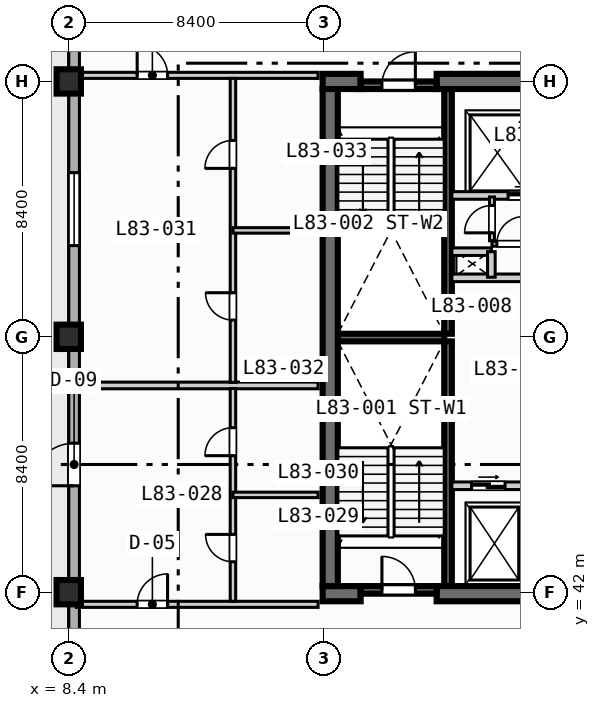
"""IFC4 building model, lengths in metres.
Left out: names, types, materials, properties, quantities, classifications, styles, units other than length and angle.
Written with IfcOpenShell. Run it as: python <this file> out.ifc"""

import sys

from ifc_helpers import new_model, si_unit, direction, frame, frame_2d, origin, origin_2d, place, context, subcontext, project, spatial, rectangle, extrude, element, fill, save


model = new_model("IFC4")
c1 = context("Model", 3, precision=1e-05, world=origin(), true_north=direction((0.0, 1.0)))
c2 = subcontext(c1, "Body", "Model", "MODEL_VIEW")
j1 = project(units=[si_unit("LENGTHUNIT", "METRE"), si_unit("PLANEANGLEUNIT", "RADIAN")], contexts=[c1])
p1 = place(None, origin())
s1 = spatial("IfcSite", under=j1, at=p1, CompositionType="ELEMENT")
p2 = place(p1, origin())
s2 = spatial("IfcBuilding", under=s1, at=p2, CompositionType="ELEMENT")
p3 = place(p2, frame((0.0, 0.0, 335.9)))
s3 = spatial("IfcBuildingStorey", under=s2, at=p3, CompositionType="ELEMENT", Elevation=335.9)
for number, where, z_axis, x_axis in (
    (1, (20.875, 42.2, 0.0), (0.0, 0.0, 1.0), (0.0, 1.0, 0.0)),
    (2, (20.875, 50.5, 0.0), (0.0, 0.0, 1.0), (0.0, 1.0, 0.0)),
):
    element("IfcWall", number, at=place(p3, frame(where, z_axis=z_axis, x_axis=x_axis)), inside=s3, PredefinedType="SOLIDWALL", context=c2, shape_type="SweptSolid", body=[
        extrude(rectangle(XDim=8.05, YDim=0.25, at=frame_2d((4.025, 0.0))), origin(), (0.0, 0.0, 1.0), 3.67),
    ])
p4 = place(p3, frame((17.25, 50.375, 0.0), z_axis=(0.0, 0.0, 1.0), x_axis=(1.0, 0.0, 0.0)))
e3 = element("IfcWall", 3, at=p4, inside=s3, PredefinedType="SOLIDWALL", context=c2, shape_type="SweptSolid", body=[
    extrude(rectangle(XDim=3.5, YDim=0.25, at=frame_2d((1.75, 0.0))), origin(), (0.0, 0.0, 1.0), 3.67),
])
p5 = place(p3, frame((16.75, 41.95, 0.0), z_axis=(0.0, 0.0, 1.0), x_axis=(1.0, 0.0, 0.0)))
e4 = element("IfcWall", 4, at=p5, inside=s3, PredefinedType="SHEAR", context=c2, shape_type="SweptSolid", body=[
    extrude(rectangle(XDim=1.25, YDim=0.5, at=frame_2d((0.625, 0.0))), origin(), (0.0, 0.0, 1.0), 3.67),
])
p6 = place(p3, frame((20.5, 41.95, 0.0), z_axis=(0.0, 0.0, 1.0), x_axis=(1.0, 0.0, 0.0)))
e5 = element("IfcWall", 5, at=p6, inside=s3, PredefinedType="SHEAR", context=c2, shape_type="SweptSolid", body=[
    extrude(rectangle(XDim=4.95, YDim=0.5, at=frame_2d((2.475, 0.0))), origin(), (0.0, 0.0, 1.0), 3.67),
])
p7 = place(p3, frame((16.75, 58.8, 0.0), z_axis=(0.0, 0.0, 1.0), x_axis=(1.0, 0.0, 0.0)))
e6 = element("IfcWall", 6, at=p7, inside=s3, PredefinedType="SHEAR", context=c2, shape_type="SweptSolid", body=[
    extrude(rectangle(XDim=1.25, YDim=0.5, at=frame_2d((0.625, 0.0))), origin(), (0.0, 0.0, 1.0), 3.67),
])
p8 = place(p3, frame((20.5, 58.8, 0.0), z_axis=(0.0, 0.0, 1.0), x_axis=(1.0, 0.0, 0.0)))
e7 = element("IfcWall", 7, at=p8, inside=s3, PredefinedType="SHEAR", context=c2, shape_type="SweptSolid", body=[
    extrude(rectangle(XDim=4.95, YDim=0.5, at=frame_2d((2.475, 0.0))), origin(), (0.0, 0.0, 1.0), 3.67),
])
p9 = place(p3, frame((17.0, 42.2, 0.0), z_axis=(0.0, 0.0, 1.0), x_axis=(0.0, 1.0, 0.0)))
e8 = element("IfcWall", 8, at=p9, inside=s3, PredefinedType="SHEAR", context=c2, shape_type="SweptSolid", body=[
    extrude(rectangle(XDim=16.35, YDim=0.5, at=frame_2d((8.175, 0.0))), origin(), (0.0, 0.0, 1.0), 3.67),
])
for number, where, z_axis, x_axis in (
    (9, (8.4, 42.0, 0.0), (0.0, 0.0, 1.0), (1.0, 0.0, 0.0)),
    (10, (8.4, 50.4, 0.0), (0.0, 0.0, 1.0), (1.0, 0.0, 0.0)),
    (11, (8.4, 58.8, 0.0), (0.0, 0.0, 1.0), (1.0, 0.0, 0.0)),
):
    element("IfcColumn", number, at=place(p3, frame(where, z_axis=z_axis, x_axis=x_axis)), inside=s3, PredefinedType="COLUMN", context=c2, shape_type="SweptSolid", body=[
        extrude(rectangle(XDim=0.8, YDim=0.8, at=origin_2d()), origin(), (0.0, 0.0, 1.0), 3.9),
    ])
p10 = place(p3, frame((8.575, 11.575, 0.0), z_axis=(0.0, 0.0, 1.0), x_axis=(0.0, 1.0, 0.0)))
e12 = element("IfcWall", 12, at=p10, inside=s3, PredefinedType="STANDARD", context=c2, shape_type="SweptSolid", body=[
    extrude(rectangle(XDim=60.85, YDim=0.35, at=frame_2d((30.425, 0.0))), origin(), (0.0, 0.0, 1.0), 3.67),
])
p11 = place(p10, frame((33.925, 0.0, 0.0)))
e13 = element("IfcOpeningElement", 13, at=p11, cuts=e12, PredefinedType="OPENING", context=c2, shape_type="SweptSolid", body=[
    extrude(rectangle(XDim=1.4, YDim=2.2, at=frame_2d((0.7, 1.1))), frame((0.0, 0.185, 0.0), z_axis=(0.0, -1.0, 0.0), x_axis=(1.0, 0.0, 0.0)), (0.0, 0.0, 1.0), 0.37),
])
p12 = place(p10, frame((25.025, 0.0, 0.85)))
e14 = element("IfcOpeningElement", 14, at=p12, cuts=e12, PredefinedType="OPENING", context=c2, shape_type="SweptSolid", body=[
    extrude(rectangle(XDim=2.4, YDim=1.95, at=frame_2d((1.2, 0.975))), frame((0.0, 0.185, 0.0), z_axis=(0.0, -1.0, 0.0), x_axis=(1.0, 0.0, 0.0)), (0.0, 0.0, 1.0), 0.37),
])
p13 = place(p10, frame((41.825, 0.0, 0.85)))
e15 = element("IfcOpeningElement", 15, at=p13, cuts=e12, PredefinedType="OPENING", context=c2, shape_type="SweptSolid", body=[
    extrude(rectangle(XDim=2.4, YDim=1.95, at=frame_2d((1.2, 0.975))), frame((0.0, 0.185, 0.0), z_axis=(0.0, -1.0, 0.0), x_axis=(1.0, 0.0, 0.0)), (0.0, 0.0, 1.0), 0.37),
])
p14 = place(p10, frame((19.25, 0.0, 0.85)))
e16 = element("IfcOpeningElement", 16, at=p14, cuts=e12, PredefinedType="OPENING", context=c2, shape_type="SweptSolid", body=[
    extrude(rectangle(XDim=1.8, YDim=1.8, at=frame_2d((0.9, 0.9))), frame((0.0, 0.185, 0.0), z_axis=(0.0, -1.0, 0.0), x_axis=(1.0, 0.0, 0.0)), (0.0, 0.0, 1.0), 0.37),
])
p15 = place(p3, frame((18.0, 42.075, 0.0), z_axis=(0.0, 0.0, 1.0), x_axis=(1.0, 0.0, 0.0)))
e17 = element("IfcWall", 17, at=p15, inside=s3, PredefinedType="SOLIDWALL", context=c2, shape_type="SweptSolid", body=[
    extrude(rectangle(XDim=2.5, YDim=0.25, at=frame_2d((1.25, 0.0))), origin(), (0.0, 0.0, 1.0), 3.67),
])
p16 = place(p15, frame((0.7, 0.0, 0.0)))
e18 = element("IfcOpeningElement", 18, at=p16, cuts=e17, PredefinedType="OPENING", context=c2, shape_type="SweptSolid", body=[
    extrude(rectangle(XDim=1.1, YDim=2.15, at=frame_2d((0.55, 1.075))), frame((0.0, 0.135, 0.0), z_axis=(0.0, -1.0, 0.0), x_axis=(1.0, 0.0, 0.0)), (0.0, 0.0, 1.0), 0.27),
])
p17 = place(p3, frame((18.0, 58.675, 0.0), z_axis=(0.0, 0.0, 1.0), x_axis=(1.0, 0.0, 0.0)))
e19 = element("IfcWall", 19, at=p17, inside=s3, PredefinedType="SOLIDWALL", context=c2, shape_type="SweptSolid", body=[
    extrude(rectangle(XDim=2.5, YDim=0.25, at=frame_2d((1.25, 0.0))), origin(), (0.0, 0.0, 1.0), 3.67),
])
p18 = place(p17, frame((0.7, 0.0, 0.0)))
e20 = element("IfcOpeningElement", 20, at=p18, cuts=e19, PredefinedType="OPENING", context=c2, shape_type="SweptSolid", body=[
    extrude(rectangle(XDim=1.1, YDim=2.15, at=frame_2d((0.55, 1.075))), frame((0.0, 0.135, 0.0), z_axis=(0.0, -1.0, 0.0), x_axis=(1.0, 0.0, 0.0)), (0.0, 0.0, 1.0), 0.27),
])
p19 = place(p3, frame((21.0, 45.5, 0.0), z_axis=(0.0, 0.0, 1.0), x_axis=(1.0, 0.0, 0.0)))
e21 = element("IfcWall", 21, at=p19, inside=s3, PredefinedType="SOLIDWALL", context=c2, shape_type="SweptSolid", body=[
    extrude(rectangle(XDim=4.15, YDim=0.25, at=frame_2d((2.075, 0.0))), origin(), (0.0, 0.0, 1.0), 3.67),
])
p20 = place(p19, frame((0.65, 0.0, 0.0)))
e22 = element("IfcOpeningElement", 22, at=p20, cuts=e21, PredefinedType="OPENING", context=c2, shape_type="SweptSolid", body=[
    extrude(rectangle(XDim=1.1, YDim=2.15, at=frame_2d((0.55, 1.075))), frame((0.0, 0.135, 0.0), z_axis=(0.0, -1.0, 0.0), x_axis=(1.0, 0.0, 0.0)), (0.0, 0.0, 1.0), 0.27),
])
p21 = place(p3, frame((21.0, 52.34, 0.0), z_axis=(0.0, 0.0, 1.0), x_axis=(1.0, 0.0, 0.0)))
e23 = element("IfcWall", 23, at=p21, inside=s3, PredefinedType="SOLIDWALL", context=c2, shape_type="SweptSolid", body=[
    extrude(rectangle(XDim=3.95, YDim=0.25, at=frame_2d((1.975, 0.0))), origin(), (0.0, 0.0, 1.0), 3.67),
])
p22 = place(p3, frame((21.0, 55.05, 0.0), z_axis=(0.0, 0.0, 1.0), x_axis=(1.0, 0.0, 0.0)))
e24 = element("IfcWall", 24, at=p22, inside=s3, PredefinedType="SOLIDWALL", context=c2, shape_type="SweptSolid", body=[
    extrude(rectangle(XDim=4.15, YDim=0.25, at=frame_2d((2.075, 0.0))), origin(), (0.0, 0.0, 1.0), 3.67),
])
p23 = place(p22, frame((1.85, 0.0, 0.0)))
e25 = element("IfcOpeningElement", 25, at=p23, cuts=e24, PredefinedType="OPENING", context=c2, shape_type="SweptSolid", body=[
    extrude(rectangle(XDim=1.1, YDim=2.15, at=frame_2d((0.55, 1.075))), frame((0.0, 0.135, 0.0), z_axis=(0.0, -1.0, 0.0), x_axis=(1.0, 0.0, 0.0)), (0.0, 0.0, 1.0), 0.27),
])
p24 = place(p3, frame((21.0, 53.2, 0.0), z_axis=(0.0, 0.0, 1.0), x_axis=(1.0, 0.0, 0.0)))
e26 = element("IfcWall", 26, at=p24, inside=s3, PredefinedType="SOLIDWALL", context=c2, shape_type="SweptSolid", body=[
    extrude(rectangle(XDim=1.3, YDim=0.25, at=frame_2d((0.65, 0.0))), origin(), (0.0, 0.0, 1.0), 3.67),
])
p25 = place(p3, frame((22.3, 52.36, 0.0), z_axis=(0.0, 0.0, 1.0), x_axis=(0.0, 1.0, 0.0)))
e27 = element("IfcWall", 27, at=p25, inside=s3, PredefinedType="SOLIDWALL", context=c2, shape_type="SweptSolid", body=[
    extrude(rectangle(XDim=0.84, YDim=0.25, at=frame_2d((0.42, 0.0))), origin(), (0.0, 0.0, 1.0), 3.67),
])
p26 = place(p3, frame((22.32, 53.56, 0.0), z_axis=(0.0, 0.0, 1.0), x_axis=(0.0, 1.0, 0.0)))
e28 = element("IfcWall", 28, at=p26, inside=s3, PredefinedType="PARTITIONING", context=c2, shape_type="SweptSolid", body=[
    extrude(rectangle(XDim=1.44, YDim=0.16, at=frame_2d((0.72, 0.0))), origin(), (0.0, 0.0, 1.0), 3.67),
])
p27 = place(p26, frame((0.26, 0.0, 0.0)))
e29 = element("IfcOpeningElement", 29, at=p27, cuts=e28, PredefinedType="OPENING", context=c2, shape_type="SweptSolid", body=[
    extrude(rectangle(XDim=0.9, YDim=2.1, at=frame_2d((0.45, 1.05))), frame((0.0, 0.09, 0.0), z_axis=(0.0, -1.0, 0.0), x_axis=(1.0, 0.0, 0.0)), (0.0, 0.0, 1.0), 0.18),
])
p28 = place(p3, frame((22.32, 53.46, 0.0), z_axis=(0.0, 0.0, 1.0), x_axis=(1.0, 0.0, 0.0)))
e30 = element("IfcWall", 30, at=p28, inside=s3, PredefinedType="PARTITIONING", context=c2, shape_type="SweptSolid", body=[
    extrude(rectangle(XDim=2.36, YDim=0.16, at=frame_2d((1.18, 0.0))), origin(), (0.0, 0.0, 1.0), 3.67),
])
p29 = place(p28, frame((0.16, 0.0, 0.0)))
e31 = element("IfcOpeningElement", 31, at=p29, cuts=e30, PredefinedType="OPENING", context=c2, shape_type="SweptSolid", body=[
    extrude(rectangle(XDim=0.9, YDim=2.1, at=frame_2d((0.45, 1.05))), frame((0.0, 0.09, 0.0), z_axis=(0.0, -1.0, 0.0), x_axis=(1.0, 0.0, 0.0)), (0.0, 0.0, 1.0), 0.18),
])
p30 = place(p3, frame((8.65, 41.6, 0.0), z_axis=(0.0, 0.0, 1.0), x_axis=(1.0, 0.0, 0.0)))
e32 = element("IfcWall", 32, at=p30, inside=s3, PredefinedType="PARTITIONING", context=c2, shape_type="SweptSolid", body=[
    extrude(rectangle(XDim=7.95, YDim=0.2, at=frame_2d((3.975, 0.0))), origin(), (0.0, 0.0, 1.0), 3.67),
])
p31 = place(p30, frame((2.0, 0.0, 0.0)))
e33 = element("IfcOpeningElement", 33, at=p31, cuts=e32, PredefinedType="OPENING", context=c2, shape_type="SweptSolid", body=[
    extrude(rectangle(XDim=1.0, YDim=2.15, at=frame_2d((0.5, 1.075))), frame((0.0, 0.11, 0.0), z_axis=(0.0, -1.0, 0.0), x_axis=(1.0, 0.0, 0.0)), (0.0, 0.0, 1.0), 0.22),
])
p32 = place(p3, frame((8.65, 59.0, 0.0), z_axis=(0.0, 0.0, 1.0), x_axis=(1.0, 0.0, 0.0)))
e34 = element("IfcWall", 34, at=p32, inside=s3, PredefinedType="PARTITIONING", context=c2, shape_type="SweptSolid", body=[
    extrude(rectangle(XDim=7.95, YDim=0.2, at=frame_2d((3.975, 0.0))), origin(), (0.0, 0.0, 1.0), 3.207),
])
p33 = place(p32, frame((2.0, 0.0, 0.0)))
e35 = element("IfcOpeningElement", 35, at=p33, cuts=e34, PredefinedType="OPENING", context=c2, shape_type="SweptSolid", body=[
    extrude(rectangle(XDim=1.0, YDim=2.15, at=frame_2d((0.5, 1.075))), frame((0.0, 0.11, 0.0), z_axis=(0.0, -1.0, 0.0), x_axis=(1.0, 0.0, 0.0)), (0.0, 0.0, 1.0), 0.22),
])
p34 = place(p3, frame((8.65, 48.8, 0.0), z_axis=(0.0, 0.0, 1.0), x_axis=(1.0, 0.0, 0.0)))
e36 = element("IfcWall", 36, at=p34, inside=s3, PredefinedType="PARTITIONING", context=c2, shape_type="SweptSolid", body=[
    extrude(rectangle(XDim=7.95, YDim=0.22, at=frame_2d((3.975, 0.0))), origin(), (0.0, 0.0, 1.0), 3.67),
])
p35 = place(p3, frame((13.8, 41.7, 0.0), z_axis=(0.0, 0.0, 1.0), x_axis=(0.0, 1.0, 0.0)))
e37 = element("IfcWall", 37, at=p35, inside=s3, PredefinedType="PLUMBINGWALL", context=c2, shape_type="SweptSolid", body=[
    extrude(rectangle(XDim=7.0, YDim=0.18, at=frame_2d((3.5, 0.0))), origin(), (0.0, 0.0, 1.0), 3.67),
])
p36 = place(p35, frame((1.3, 0.0, 0.0)))
e38 = element("IfcOpeningElement", 38, at=p36, cuts=e37, PredefinedType="OPENING", context=c2, shape_type="SweptSolid", body=[
    extrude(rectangle(XDim=0.9, YDim=2.1, at=frame_2d((0.45, 1.05))), frame((0.0, 0.1, 0.0), z_axis=(0.0, -1.0, 0.0), x_axis=(1.0, 0.0, 0.0)), (0.0, 0.0, 1.0), 0.2),
])
p37 = place(p35, frame((4.79, 0.0, 0.0)))
e39 = element("IfcOpeningElement", 39, at=p37, cuts=e37, PredefinedType="OPENING", context=c2, shape_type="SweptSolid", body=[
    extrude(rectangle(XDim=0.92, YDim=2.1, at=frame_2d((0.46, 1.05))), frame((0.0, 0.1, 0.0), z_axis=(0.0, -1.0, 0.0), x_axis=(1.0, 0.0, 0.0)), (0.0, 0.0, 1.0), 0.2),
])
p38 = place(p3, frame((13.8, 45.2, 0.0), z_axis=(0.0, 0.0, 1.0), x_axis=(1.0, 0.0, 0.0)))
e40 = element("IfcWall", 40, at=p38, inside=s3, PredefinedType="PLUMBINGWALL", context=c2, shape_type="SweptSolid", body=[
    extrude(rectangle(XDim=2.8, YDim=0.18, at=frame_2d((1.4, 0.0))), origin(), (0.0, 0.0, 1.0), 3.67),
])
p39 = place(p3, frame((13.8, 48.9, 0.0), z_axis=(0.0, 0.0, 1.0), x_axis=(0.0, 1.0, 0.0)))
e41 = element("IfcWall", 41, at=p39, inside=s3, PredefinedType="PLUMBINGWALL", context=c2, shape_type="SweptSolid", body=[
    extrude(rectangle(XDim=10.0, YDim=0.18, at=frame_2d((5.0, 0.0))), origin(), (0.0, 0.0, 1.0), 3.67),
])
p40 = place(p39, frame((2.05, 0.0, 0.0)))
e42 = element("IfcOpeningElement", 42, at=p40, cuts=e41, PredefinedType="OPENING", context=c2, shape_type="SweptSolid", body=[
    extrude(rectangle(XDim=0.9, YDim=2.1, at=frame_2d((0.45, 1.05))), frame((0.0, 0.1, 0.0), z_axis=(0.0, -1.0, 0.0), x_axis=(1.0, 0.0, 0.0)), (0.0, 0.0, 1.0), 0.2),
])
p41 = place(p39, frame((7.04, 0.0, 0.0)))
e43 = element("IfcOpeningElement", 43, at=p41, cuts=e41, PredefinedType="OPENING", context=c2, shape_type="SweptSolid", body=[
    extrude(rectangle(XDim=0.92, YDim=2.1, at=frame_2d((0.46, 1.05))), frame((0.0, 0.1, 0.0), z_axis=(0.0, -1.0, 0.0), x_axis=(1.0, 0.0, 0.0)), (0.0, 0.0, 1.0), 0.2),
])
p42 = place(p3, frame((13.8, 53.9, 0.0), z_axis=(0.0, 0.0, 1.0), x_axis=(1.0, 0.0, 0.0)))
e44 = element("IfcWall", 44, at=p42, inside=s3, PredefinedType="PLUMBINGWALL", context=c2, shape_type="SweptSolid", body=[
    extrude(rectangle(XDim=2.8, YDim=0.18, at=frame_2d((1.4, 0.0))), origin(), (0.0, 0.0, 1.0), 3.67),
])
p43 = place(p11, origin())
e45 = element("IfcDoor", 45, at=p43, inside=s3, OperationType="SINGLE_SWING_LEFT", PredefinedType="DOOR", context=c2, shape_type="SweptSolid", body=[
    extrude(rectangle(XDim=1.4, YDim=2.2, at=frame_2d((0.7, 1.1))), frame((0.0, 0.025, 0.0), z_axis=(0.0, -1.0, 0.0), x_axis=(1.0, 0.0, 0.0)), (0.0, 0.0, 1.0), 0.05),
])
fill(e13, e45)
p44 = place(p13, origin())
e46 = element("IfcWindow", 46, at=p44, inside=s3, PartitioningType="SINGLE_PANEL", PredefinedType="WINDOW", context=c2, shape_type="SweptSolid", body=[
    extrude(rectangle(XDim=2.4, YDim=1.95, at=frame_2d((1.2, 0.975))), frame((0.0, 0.03, 0.0), z_axis=(0.0, -1.0, 0.0), x_axis=(1.0, 0.0, 0.0)), (0.0, 0.0, 1.0), 0.06),
])
fill(e15, e46)
p45 = place(p16, origin())
e47 = element("IfcDoor", 47, at=p45, inside=s3, OperationType="SINGLE_SWING_LEFT", PredefinedType="DOOR", context=c2, shape_type="SweptSolid", body=[
    extrude(rectangle(XDim=1.1, YDim=2.15, at=frame_2d((0.55, 1.075))), frame((0.0, 0.025, 0.0), z_axis=(0.0, -1.0, 0.0), x_axis=(1.0, 0.0, 0.0)), (0.0, 0.0, 1.0), 0.05),
])
fill(e18, e47)
p46 = place(p18, origin())
e48 = element("IfcDoor", 48, at=p46, inside=s3, OperationType="SINGLE_SWING_RIGHT", PredefinedType="DOOR", context=c2, shape_type="SweptSolid", body=[
    extrude(rectangle(XDim=1.1, YDim=2.15, at=frame_2d((0.55, 1.075))), frame((0.0, 0.025, 0.0), z_axis=(0.0, -1.0, 0.0), x_axis=(1.0, 0.0, 0.0)), (0.0, 0.0, 1.0), 0.05),
])
fill(e20, e48)
p47 = place(p20, origin())
e49 = element("IfcDoor", 49, at=p47, inside=s3, OperationType="SLIDING_TO_LEFT", PredefinedType="DOOR", context=c2, shape_type="SweptSolid", body=[
    extrude(rectangle(XDim=1.1, YDim=2.15, at=frame_2d((0.55, 1.075))), frame((0.0, 0.025, 0.0), z_axis=(0.0, -1.0, 0.0), x_axis=(1.0, 0.0, 0.0)), (0.0, 0.0, 1.0), 0.05),
])
fill(e22, e49)
p48 = place(p23, origin())
e50 = element("IfcDoor", 50, at=p48, inside=s3, OperationType="SLIDING_TO_LEFT", PredefinedType="DOOR", context=c2, shape_type="SweptSolid", body=[
    extrude(rectangle(XDim=1.1, YDim=2.15, at=frame_2d((0.55, 1.075))), frame((0.0, 0.025, 0.0), z_axis=(0.0, -1.0, 0.0), x_axis=(1.0, 0.0, 0.0)), (0.0, 0.0, 1.0), 0.05),
])
fill(e25, e50)
p49 = place(p27, origin())
e51 = element("IfcDoor", 51, at=p49, inside=s3, OperationType="SINGLE_SWING_LEFT", PredefinedType="DOOR", context=c2, shape_type="SweptSolid", body=[
    extrude(rectangle(XDim=0.9, YDim=2.1, at=frame_2d((0.45, 1.05))), frame((0.0, 0.025, 0.0), z_axis=(0.0, -1.0, 0.0), x_axis=(1.0, 0.0, 0.0)), (0.0, 0.0, 1.0), 0.05),
])
fill(e29, e51)
p50 = place(p29, origin())
e52 = element("IfcDoor", 52, at=p50, inside=s3, OperationType="SINGLE_SWING_RIGHT", PredefinedType="DOOR", context=c2, shape_type="SweptSolid", body=[
    extrude(rectangle(XDim=0.9, YDim=2.1, at=frame_2d((0.45, 1.05))), frame((0.0, 0.025, 0.0), z_axis=(0.0, -1.0, 0.0), x_axis=(1.0, 0.0, 0.0)), (0.0, 0.0, 1.0), 0.05),
])
fill(e31, e52)
p51 = place(p31, origin())
e53 = element("IfcDoor", 53, at=p51, inside=s3, OperationType="SINGLE_SWING_RIGHT", PredefinedType="DOOR", context=c2, shape_type="SweptSolid", body=[
    extrude(rectangle(XDim=1.0, YDim=2.15, at=frame_2d((0.5, 1.075))), frame((0.0, 0.025, 0.0), z_axis=(0.0, -1.0, 0.0), x_axis=(1.0, 0.0, 0.0)), (0.0, 0.0, 1.0), 0.05),
])
fill(e33, e53)
p52 = place(p33, origin())
e54 = element("IfcDoor", 54, at=p52, inside=s3, OperationType="SINGLE_SWING_LEFT", PredefinedType="DOOR", context=c2, shape_type="SweptSolid", body=[
    extrude(rectangle(XDim=1.0, YDim=2.15, at=frame_2d((0.5, 1.075))), frame((0.0, 0.025, 0.0), z_axis=(0.0, -1.0, 0.0), x_axis=(1.0, 0.0, 0.0)), (0.0, 0.0, 1.0), 0.05),
])
fill(e35, e54)
p53 = place(p36, origin())
e55 = element("IfcDoor", 55, at=p53, inside=s3, OperationType="SINGLE_SWING_RIGHT", PredefinedType="DOOR", context=c2, shape_type="SweptSolid", body=[
    extrude(rectangle(XDim=0.9, YDim=2.1, at=frame_2d((0.45, 1.05))), frame((0.0, 0.025, 0.0), z_axis=(0.0, -1.0, 0.0), x_axis=(1.0, 0.0, 0.0)), (0.0, 0.0, 1.0), 0.05),
])
fill(e38, e55)
p54 = place(p37, origin())
e56 = element("IfcDoor", 56, at=p54, inside=s3, OperationType="SINGLE_SWING_LEFT", PredefinedType="DOOR", context=c2, shape_type="SweptSolid", body=[
    extrude(rectangle(XDim=0.92, YDim=2.1, at=frame_2d((0.46, 1.05))), frame((0.0, 0.025, 0.0), z_axis=(0.0, -1.0, 0.0), x_axis=(1.0, 0.0, 0.0)), (0.0, 0.0, 1.0), 0.05),
])
fill(e39, e56)
p55 = place(p40, origin())
e57 = element("IfcDoor", 57, at=p55, inside=s3, OperationType="SINGLE_SWING_RIGHT", PredefinedType="DOOR", context=c2, shape_type="SweptSolid", body=[
    extrude(rectangle(XDim=0.9, YDim=2.1, at=frame_2d((0.45, 1.05))), frame((0.0, 0.025, 0.0), z_axis=(0.0, -1.0, 0.0), x_axis=(1.0, 0.0, 0.0)), (0.0, 0.0, 1.0), 0.05),
])
fill(e42, e57)
p56 = place(p41, origin())
e58 = element("IfcDoor", 58, at=p56, inside=s3, OperationType="SINGLE_SWING_LEFT", PredefinedType="DOOR", context=c2, shape_type="SweptSolid", body=[
    extrude(rectangle(XDim=0.92, YDim=2.1, at=frame_2d((0.46, 1.05))), frame((0.0, 0.025, 0.0), z_axis=(0.0, -1.0, 0.0), x_axis=(1.0, 0.0, 0.0)), (0.0, 0.0, 1.0), 0.05),
])
fill(e43, e58)
save(model, sys.argv[1])
